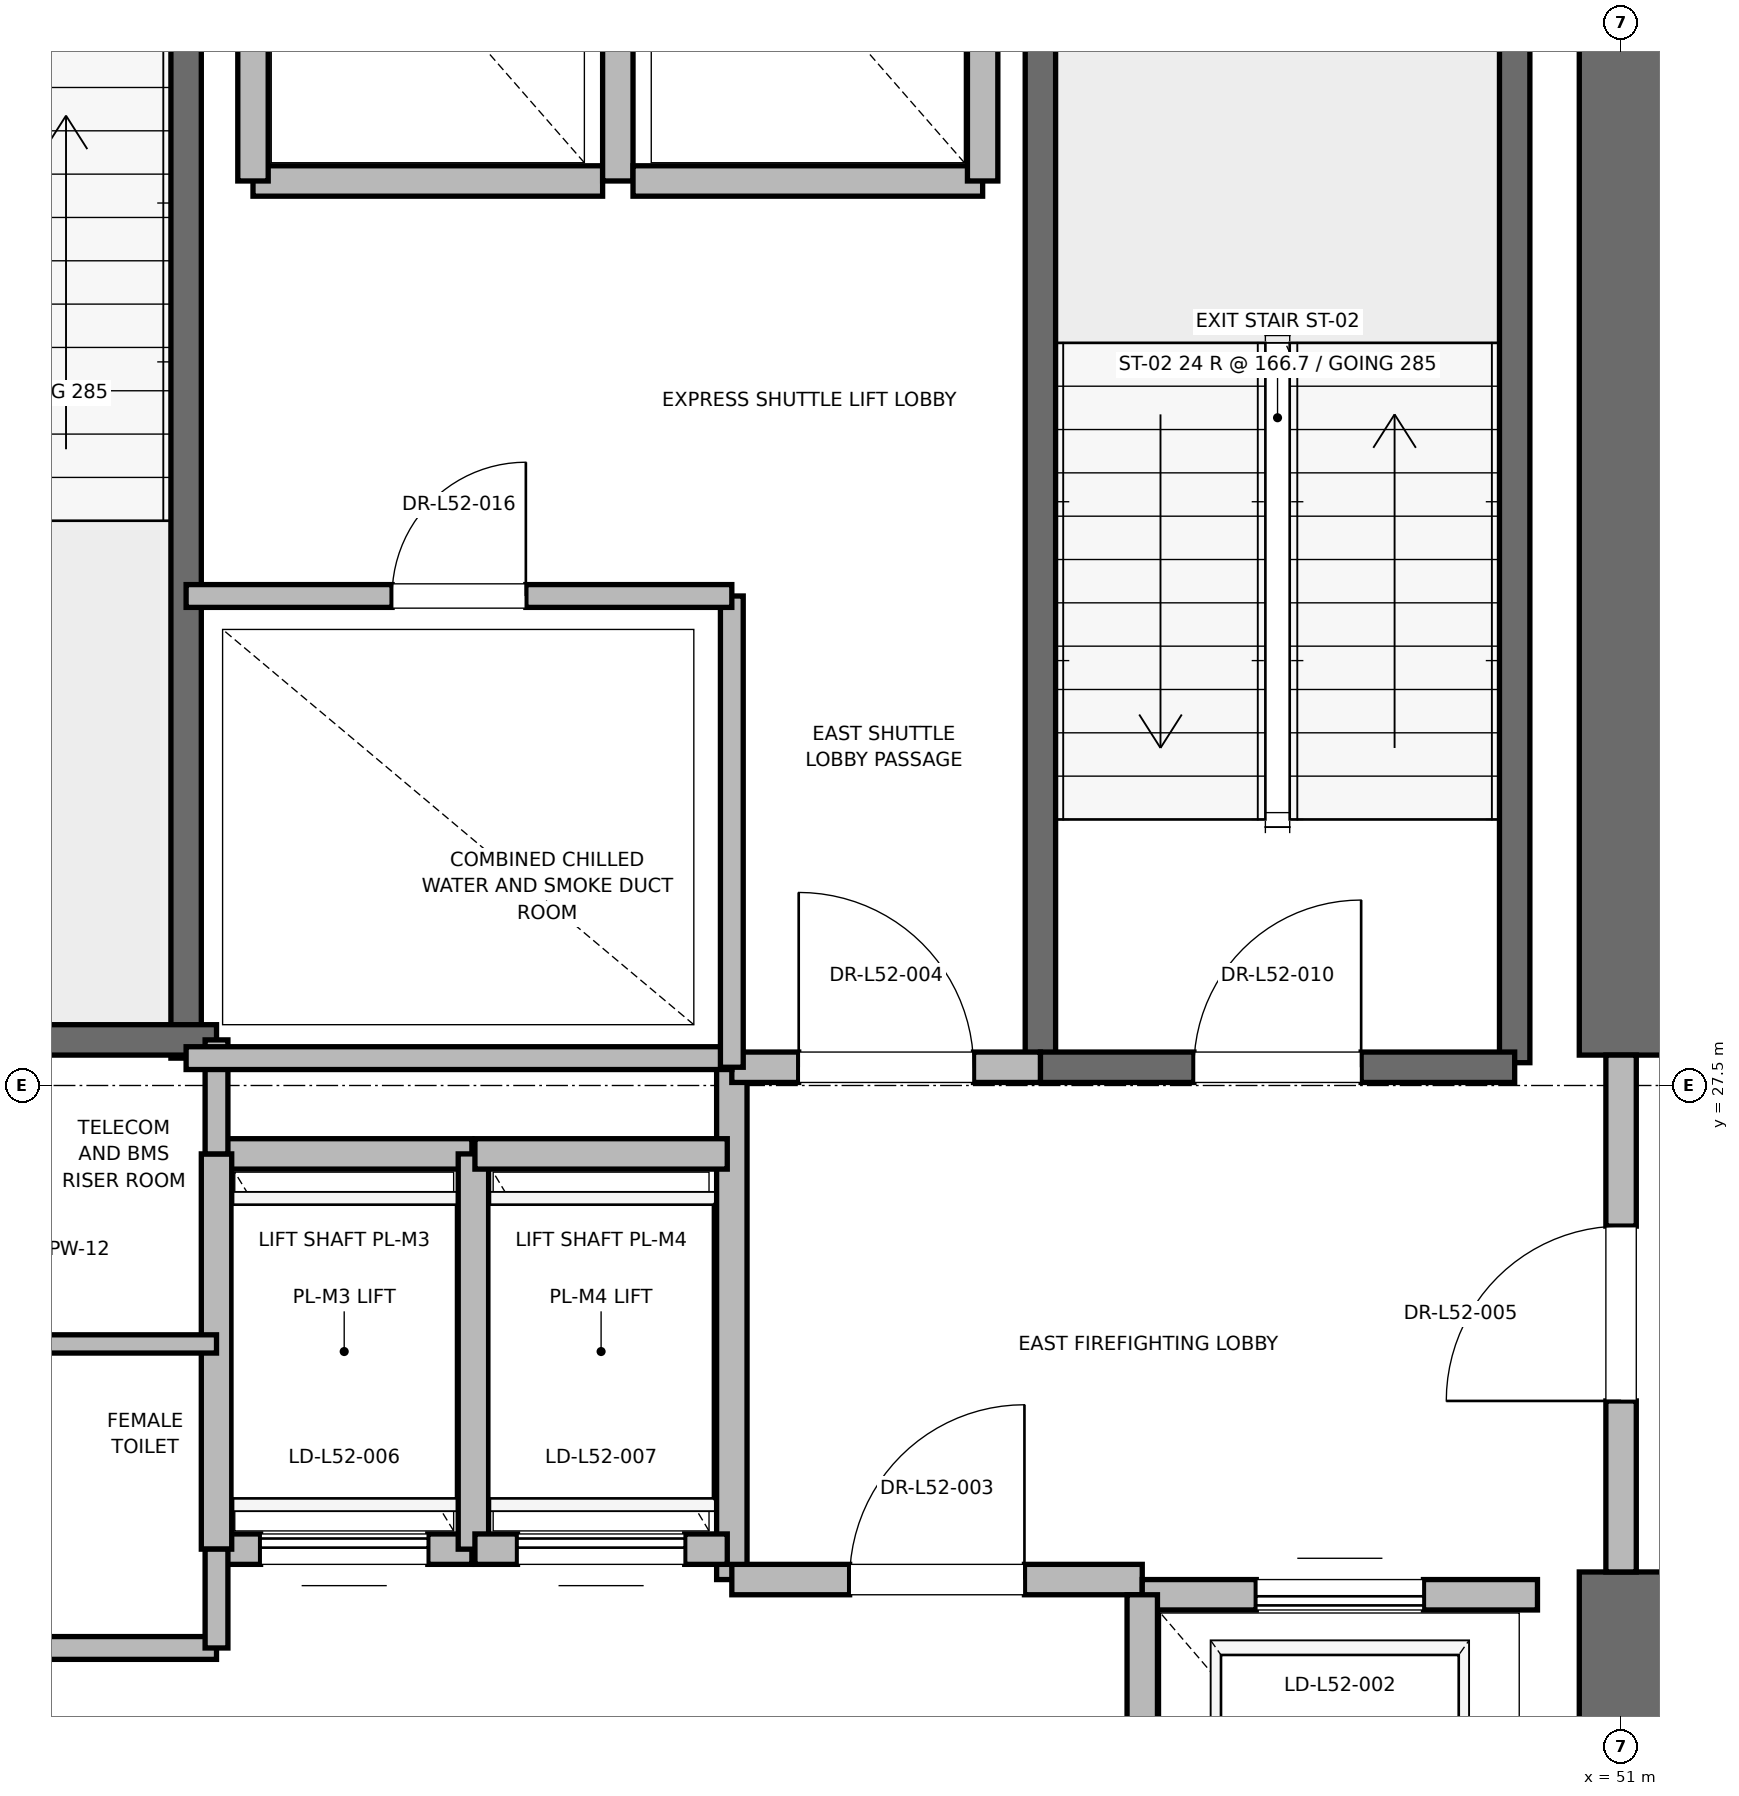
"""IFC4 building model, lengths in metres.
Left out: names, types, materials, properties, quantities, classifications, styles, units other than length and angle.
Written with IfcOpenShell. Run it as: python <this file> out.ifc"""

import sys

from ifc_helpers import new_model, si_unit, direction, frame, frame_2d, origin, place, context, subcontext, project, spatial, rectangle, extrude, element, fill, save


model = new_model("IFC4")
c1 = context("Model", 3, precision=1e-05, world=origin(), true_north=direction((0.0, 1.0)))
c2 = subcontext(c1, "Body", "Model", "MODEL_VIEW")
j1 = project(units=[si_unit("LENGTHUNIT", "METRE"), si_unit("PLANEANGLEUNIT", "RADIAN")], contexts=[c1])
p1 = place(None, origin())
s1 = spatial("IfcSite", under=j1, at=p1, CompositionType="ELEMENT")
p2 = place(p1, origin())
s2 = spatial("IfcBuilding", under=s1, at=p2, CompositionType="ELEMENT")
p3 = place(p2, frame((0.0, 0.0, 225.2)))
s3 = spatial("IfcBuildingStorey", under=s2, at=p3, CompositionType="ELEMENT", Elevation=225.2)
p4 = place(p3, frame((51.0, 18.5, 0.0), z_axis=(0.0, 0.0, 1.0), x_axis=(0.0, 1.0, 0.0)))
e1 = element("IfcWall", 1, at=p4, inside=s3, PredefinedType="SHEAR", context=c2, shape_type="SweptSolid", body=[
    extrude(rectangle(XDim=5.8, YDim=0.55, at=frame_2d((2.9, 0.0))), origin(), (0.0, 0.0, 1.0), 3.775),
])
p5 = place(p3, frame((51.0, 27.7, 0.0), z_axis=(0.0, 0.0, 1.0), x_axis=(0.0, 1.0, 0.0)))
e2 = element("IfcWall", 2, at=p5, inside=s3, PredefinedType="SHEAR", context=c2, shape_type="SweptSolid", body=[
    extrude(rectangle(XDim=8.8, YDim=0.55, at=frame_2d((4.4, 0.0))), origin(), (0.0, 0.0, 1.0), 3.775),
])
p6 = place(p3, frame((50.3, 27.65, 0.0), z_axis=(0.0, 0.0, 1.0), x_axis=(0.0, 1.0, 0.0)))
e3 = element("IfcWall", 3, at=p6, inside=s3, PredefinedType="SOLIDWALL", context=c2, shape_type="SweptSolid", body=[
    extrude(rectangle(XDim=8.15, YDim=0.2, at=frame_2d((4.075, 0.0))), origin(), (0.0, 0.0, 1.0), 3.775),
])
p7 = place(p3, frame((47.18, 27.62, 0.0), z_axis=(0.0, 0.0, 1.0), x_axis=(0.0, 1.0, 0.0)))
e4 = element("IfcWall", 4, at=p7, inside=s3, PredefinedType="SOLIDWALL", context=c2, shape_type="SweptSolid", body=[
    extrude(rectangle(XDim=8.18, YDim=0.2, at=frame_2d((4.09, 0.0))), origin(), (0.0, 0.0, 1.0), 3.775),
])
p8 = place(p3, frame((47.18, 27.62, 0.0), z_axis=(0.0, 0.0, 1.0), x_axis=(1.0, 0.0, 0.0)))
e5 = element("IfcWall", 5, at=p8, inside=s3, PredefinedType="SOLIDWALL", context=c2, shape_type="SweptSolid", body=[
    extrude(rectangle(XDim=3.12, YDim=0.2, at=frame_2d((1.56, 0.0))), origin(), (0.0, 0.0, 1.0), 3.775),
])
p9 = place(p8, frame((1.01, 0.0, 0.0)))
e6 = element("IfcOpeningElement", 6, at=p9, cuts=e5, PredefinedType="OPENING", context=c2, shape_type="SweptSolid", body=[
    extrude(rectangle(XDim=1.1, YDim=2.15, at=frame_2d((0.55, 1.075))), frame((0.0, 0.1, 0.0), z_axis=(0.0, -1.0, 0.0), x_axis=(1.0, 0.0, 0.0)), (0.0, 0.0, 1.0), 0.2),
])
p10 = place(p3, frame((41.56, 27.68, 0.0), z_axis=(0.0, 0.0, 1.0), x_axis=(0.0, 1.0, 0.0)))
e7 = element("IfcWall", 7, at=p10, inside=s3, PredefinedType="SOLIDWALL", context=c2, shape_type="SweptSolid", body=[
    extrude(rectangle(XDim=8.57, YDim=0.2, at=frame_2d((4.285, 0.0))), origin(), (0.0, 0.0, 1.0), 3.775),
])
p11 = place(p3, frame((38.44, 27.8, 0.0), z_axis=(0.0, 0.0, 1.0), x_axis=(1.0, 0.0, 0.0)))
e8 = element("IfcWall", 8, at=p11, inside=s3, PredefinedType="SOLIDWALL", context=c2, shape_type="SweptSolid", body=[
    extrude(rectangle(XDim=3.32, YDim=0.2, at=frame_2d((1.66, 0.0))), origin(), (0.0, 0.0, 1.0), 3.775),
])
p12 = place(p3, frame((45.15, 24.25, 0.0), z_axis=(0.0, 0.0, 1.0), x_axis=(0.0, 1.0, 0.0)))
e9 = element("IfcWall", 9, at=p12, inside=s3, PredefinedType="PARTITIONING", context=c2, shape_type="SweptSolid", body=[
    extrude(rectangle(XDim=3.37, YDim=0.2, at=frame_2d((1.685, 0.0))), origin(), (0.0, 0.0, 1.0), 3.775),
])
p13 = place(p3, frame((45.15, 24.25, 0.0), z_axis=(0.0, 0.0, 1.0), x_axis=(1.0, 0.0, 0.0)))
e10 = element("IfcWall", 10, at=p13, inside=s3, PredefinedType="PARTITIONING", context=c2, shape_type="SweptSolid", body=[
    extrude(rectangle(XDim=2.7, YDim=0.2, at=frame_2d((1.35, 0.0))), origin(), (0.0, 0.0, 1.0), 3.775),
])
p14 = place(p13, frame((0.775, 0.0, 0.0)))
e11 = element("IfcOpeningElement", 11, at=p14, cuts=e10, PredefinedType="OPENING", context=c2, shape_type="SweptSolid", body=[
    extrude(rectangle(XDim=1.15, YDim=2.2, at=frame_2d((0.575, 1.1))), frame((0.0, 0.1, 0.0), z_axis=(0.0, -1.0, 0.0), x_axis=(1.0, 0.0, 0.0)), (0.0, 0.0, 1.0), 0.2),
])
p15 = place(p3, frame((45.15, 27.62, 0.0), z_axis=(0.0, 0.0, 1.0), x_axis=(1.0, 0.0, 0.0)))
e12 = element("IfcWall", 12, at=p15, inside=s3, PredefinedType="PARTITIONING", context=c2, shape_type="SweptSolid", body=[
    extrude(rectangle(XDim=2.03, YDim=0.2, at=frame_2d((1.015, 0.0))), origin(), (0.0, 0.0, 1.0), 3.775),
])
p16 = place(p15, frame((0.44, 0.0, 0.0)))
e13 = element("IfcOpeningElement", 13, at=p16, cuts=e12, PredefinedType="OPENING", context=c2, shape_type="SweptSolid", body=[
    extrude(rectangle(XDim=1.15, YDim=2.2, at=frame_2d((0.575, 1.1))), frame((0.0, 0.1, 0.0), z_axis=(0.0, -1.0, 0.0), x_axis=(1.0, 0.0, 0.0)), (0.0, 0.0, 1.0), 0.2),
])
p17 = place(p3, frame((51.0, 24.3, 0.0), z_axis=(0.0, 0.0, 1.0), x_axis=(0.0, 1.0, 0.0)))
e14 = element("IfcWall", 14, at=p17, inside=s3, PredefinedType="PARTITIONING", context=c2, shape_type="SweptSolid", body=[
    extrude(rectangle(XDim=3.4, YDim=0.2, at=frame_2d((1.7, 0.0))), origin(), (0.0, 0.0, 1.0), 2.755),
])
p18 = place(p17, frame((1.125, 0.0, 0.0)))
e15 = element("IfcOpeningElement", 15, at=p18, cuts=e14, PredefinedType="OPENING", context=c2, shape_type="SweptSolid", body=[
    extrude(rectangle(XDim=1.15, YDim=2.2, at=frame_2d((0.575, 1.1))), frame((0.0, 0.1, 0.0), z_axis=(0.0, -1.0, 0.0), x_axis=(1.0, 0.0, 0.0)), (0.0, 0.0, 1.0), 0.2),
])
p19 = place(p3, frame((50.45, 24.15, 0.0), z_axis=(0.0, 0.0, 1.0), x_axis=(-1.0, 0.0, 0.0)))
e16 = element("IfcWall", 16, at=p19, inside=s3, PredefinedType="SOLIDWALL", context=c2, shape_type="SweptSolid", body=[
    extrude(rectangle(XDim=2.6, YDim=0.2, at=frame_2d((1.3, 0.0))), origin(), (0.0, 0.0, 1.0), 2.755),
])
p20 = place(p19, frame((0.75, 0.0, 0.0)))
e17 = element("IfcOpeningElement", 17, at=p20, cuts=e16, PredefinedType="OPENING", context=c2, shape_type="SweptSolid", body=[
    extrude(rectangle(XDim=1.1, YDim=2.2, at=frame_2d((0.55, 1.1))), frame((0.0, 0.1, 0.0), z_axis=(0.0, -1.0, 0.0), x_axis=(1.0, 0.0, 0.0)), (0.0, 0.0, 1.0), 0.2),
])
p21 = place(p3, frame((47.85, 24.15, 0.0), z_axis=(0.0, 0.0, 1.0), x_axis=(0.0, -1.0, 0.0)))
e18 = element("IfcWall", 18, at=p21, inside=s3, PredefinedType="SOLIDWALL", context=c2, shape_type="SweptSolid", body=[
    extrude(rectangle(XDim=3.0, YDim=0.2, at=frame_2d((1.5, 0.0))), origin(), (0.0, 0.0, 1.0), 3.775),
])
p22 = place(p3, frame((41.76, 24.45, 0.0), z_axis=(0.0, 0.0, 1.0), x_axis=(1.0, 0.0, 0.0)))
e19 = element("IfcWall", 19, at=p22, inside=s3, PredefinedType="SOLIDWALL", context=c2, shape_type="SweptSolid", body=[
    extrude(rectangle(XDim=1.68, YDim=0.2, at=frame_2d((0.84, 0.0))), origin(), (0.0, 0.0, 1.0), 3.775),
])
p23 = place(p22, frame((0.29, 0.0, 0.0)))
e20 = element("IfcOpeningElement", 20, at=p23, cuts=e19, PredefinedType="OPENING", context=c2, shape_type="SweptSolid", body=[
    extrude(rectangle(XDim=1.1, YDim=2.2, at=frame_2d((0.55, 1.1))), frame((0.0, 0.1, 0.0), z_axis=(0.0, -1.0, 0.0), x_axis=(1.0, 0.0, 0.0)), (0.0, 0.0, 1.0), 0.2),
])
p24 = place(p3, frame((43.44, 27.05, 0.0), z_axis=(0.0, 0.0, 1.0), x_axis=(-1.0, 0.0, 0.0)))
e21 = element("IfcWall", 21, at=p24, inside=s3, PredefinedType="SOLIDWALL", context=c2, shape_type="SweptSolid", body=[
    extrude(rectangle(XDim=1.68, YDim=0.2, at=frame_2d((0.84, 0.0))), origin(), (0.0, 0.0, 1.0), 3.775),
])
for number, where, z_axis, x_axis in (
    (22, (41.76, 27.05, 0.0), (0.0, 0.0, 1.0), (0.0, -1.0, 0.0)),
    (23, (43.45, 24.45, 0.0), (0.0, 0.0, 1.0), (0.0, 1.0, 0.0)),
):
    element("IfcWall", number, at=place(p3, frame(where, z_axis=z_axis, x_axis=x_axis)), inside=s3, PredefinedType="SOLIDWALL", context=c2, shape_type="SweptSolid", body=[
        extrude(rectangle(XDim=2.6, YDim=0.2, at=frame_2d((1.3, 0.0))), origin(), (0.0, 0.0, 1.0), 3.775),
    ])
p25 = place(p3, frame((43.46, 24.45, 0.0), z_axis=(0.0, 0.0, 1.0), x_axis=(1.0, 0.0, 0.0)))
e24 = element("IfcWall", 24, at=p25, inside=s3, PredefinedType="SOLIDWALL", context=c2, shape_type="SweptSolid", body=[
    extrude(rectangle(XDim=1.66, YDim=0.2, at=frame_2d((0.83, 0.0))), origin(), (0.0, 0.0, 1.0), 3.775),
])
p26 = place(p25, frame((0.28, 0.0, 0.0)))
e25 = element("IfcOpeningElement", 25, at=p26, cuts=e24, PredefinedType="OPENING", context=c2, shape_type="SweptSolid", body=[
    extrude(rectangle(XDim=1.1, YDim=2.2, at=frame_2d((0.55, 1.1))), frame((0.0, 0.1, 0.0), z_axis=(0.0, -1.0, 0.0), x_axis=(1.0, 0.0, 0.0)), (0.0, 0.0, 1.0), 0.2),
])
p27 = place(p3, frame((45.12, 27.05, 0.0), z_axis=(0.0, 0.0, 1.0), x_axis=(-1.0, 0.0, 0.0)))
e26 = element("IfcWall", 26, at=p27, inside=s3, PredefinedType="SOLIDWALL", context=c2, shape_type="SweptSolid", body=[
    extrude(rectangle(XDim=1.66, YDim=0.2, at=frame_2d((0.83, 0.0))), origin(), (0.0, 0.0, 1.0), 3.775),
])
p28 = place(p3, frame((42.0, 33.45, 0.0), z_axis=(0.0, 0.0, 1.0), x_axis=(1.0, 0.0, 0.0)))
e27 = element("IfcWall", 27, at=p28, inside=s3, PredefinedType="SOLIDWALL", context=c2, shape_type="SweptSolid", body=[
    extrude(rectangle(XDim=2.3, YDim=0.2, at=frame_2d((1.15, 0.0))), origin(), (0.0, 0.0, 1.0), 3.775),
])
for number, where, z_axis, x_axis in (
    (28, (42.0, 36.05, 0.0), (0.0, 0.0, 1.0), (0.0, -1.0, 0.0)),
    (29, (44.4, 33.45, 0.0), (0.0, 0.0, 1.0), (0.0, 1.0, 0.0)),
):
    element("IfcWall", number, at=place(p3, frame(where, z_axis=z_axis, x_axis=x_axis)), inside=s3, PredefinedType="SOLIDWALL", context=c2, shape_type="SweptSolid", body=[
        extrude(rectangle(XDim=2.6, YDim=0.2, at=frame_2d((1.3, 0.0))), origin(), (0.0, 0.0, 1.0), 2.755),
    ])
p29 = place(p3, frame((44.5, 33.45, 0.0), z_axis=(0.0, 0.0, 1.0), x_axis=(1.0, 0.0, 0.0)))
e30 = element("IfcWall", 30, at=p29, inside=s3, PredefinedType="SOLIDWALL", context=c2, shape_type="SweptSolid", body=[
    extrude(rectangle(XDim=2.3, YDim=0.2, at=frame_2d((1.15, 0.0))), origin(), (0.0, 0.0, 1.0), 3.775),
])
p30 = place(p3, frame((46.8, 33.45, 0.0), z_axis=(0.0, 0.0, 1.0), x_axis=(0.0, 1.0, 0.0)))
e31 = element("IfcWall", 31, at=p30, inside=s3, PredefinedType="SOLIDWALL", context=c2, shape_type="SweptSolid", body=[
    extrude(rectangle(XDim=2.6, YDim=0.2, at=frame_2d((1.3, 0.0))), origin(), (0.0, 0.0, 1.0), 3.775),
])
p31 = place(p3, frame((39.95, 23.8, 0.0), z_axis=(0.0, 0.0, 1.0), x_axis=(1.0, 0.0, 0.0)))
e32 = element("IfcWall", 32, at=p31, inside=s3, PredefinedType="PARTITIONING", context=c2, shape_type="SweptSolid", body=[
    extrude(rectangle(XDim=1.81, YDim=0.15, at=frame_2d((0.905, 0.0))), origin(), (0.0, 0.0, 1.0), 2.85),
])
p32 = place(p3, frame((39.95, 25.8, 0.0), z_axis=(0.0, 0.0, 1.0), x_axis=(1.0, 0.0, 0.0)))
e33 = element("IfcWall", 33, at=p32, inside=s3, PredefinedType="PARTITIONING", context=c2, shape_type="SweptSolid", body=[
    extrude(rectangle(XDim=1.81, YDim=0.12, at=frame_2d((0.905, 0.0))), origin(), (0.0, 0.0, 1.0), 2.85),
])
p33 = place(p3, frame((41.76, 23.8, 0.0), z_axis=(0.0, 0.0, 1.0), x_axis=(0.0, 1.0, 0.0)))
e34 = element("IfcWall", 34, at=p33, inside=s3, PredefinedType="PARTITIONING", context=c2, shape_type="SweptSolid", body=[
    extrude(rectangle(XDim=0.65, YDim=0.15, at=frame_2d((0.325, 0.0))), origin(), (0.0, 0.0, 1.0), 2.85),
])
p34 = place(p3, frame((41.76, 27.05, 0.0), z_axis=(0.0, 0.0, 1.0), x_axis=(0.0, 1.0, 0.0)))
e35 = element("IfcWall", 35, at=p34, inside=s3, PredefinedType="PARTITIONING", context=c2, shape_type="SweptSolid", body=[
    extrude(rectangle(XDim=0.75, YDim=0.15, at=frame_2d((0.375, 0.0))), origin(), (0.0, 0.0, 1.0), 2.85),
])
p35 = place(p3, frame((41.56, 27.68, 0.0), z_axis=(0.0, 0.0, 1.0), x_axis=(1.0, 0.0, 0.0)))
e36 = element("IfcWall", 36, at=p35, inside=s3, PredefinedType="PARTITIONING", context=c2, shape_type="SweptSolid", body=[
    extrude(rectangle(XDim=3.59, YDim=0.15, at=frame_2d((1.795, 0.0))), origin(), (0.0, 0.0, 1.0), 2.85),
])
p36 = place(p3, frame((45.15, 27.62, 0.0), z_axis=(0.0, 0.0, 1.0), x_axis=(0.0, 1.0, 0.0)))
e37 = element("IfcWall", 37, at=p36, inside=s3, PredefinedType="PARTITIONING", context=c2, shape_type="SweptSolid", body=[
    extrude(rectangle(XDim=3.1, YDim=0.15, at=frame_2d((1.55, 0.0))), origin(), (0.0, 0.0, 1.0), 2.85),
])
p37 = place(p3, frame((41.56, 30.72, 0.0), z_axis=(0.0, 0.0, 1.0), x_axis=(1.0, 0.0, 0.0)))
e38 = element("IfcWall", 38, at=p37, inside=s3, PredefinedType="PARTITIONING", context=c2, shape_type="SweptSolid", body=[
    extrude(rectangle(XDim=3.59, YDim=0.15, at=frame_2d((1.795, 0.0))), origin(), (0.0, 0.0, 1.0), 2.85),
])
p38 = place(p37, frame((1.355, 0.0, 0.0)))
e39 = element("IfcOpeningElement", 39, at=p38, cuts=e38, PredefinedType="OPENING", context=c2, shape_type="SweptSolid", body=[
    extrude(rectangle(XDim=0.88, YDim=2.1, at=frame_2d((0.44, 1.05))), frame((0.0, 0.075, 0.0), z_axis=(0.0, -1.0, 0.0), x_axis=(1.0, 0.0, 0.0)), (0.0, 0.0, 1.0), 0.15),
])
p39 = place(p9, origin())
e40 = element("IfcDoor", 40, at=p39, inside=s3, OperationType="SINGLE_SWING_RIGHT", PredefinedType="DOOR", context=c2, shape_type="SweptSolid", body=[
    extrude(rectangle(XDim=1.1, YDim=2.15, at=frame_2d((0.55, 1.075))), frame((0.0, 0.025, 0.0), z_axis=(0.0, -1.0, 0.0), x_axis=(1.0, 0.0, 0.0)), (0.0, 0.0, 1.0), 0.05),
])
fill(e6, e40)
p40 = place(p14, origin())
e41 = element("IfcDoor", 41, at=p40, inside=s3, OperationType="SINGLE_SWING_RIGHT", PredefinedType="DOOR", context=c2, shape_type="SweptSolid", body=[
    extrude(rectangle(XDim=1.15, YDim=2.2, at=frame_2d((0.575, 1.1))), frame((0.0, 0.025, 0.0), z_axis=(0.0, -1.0, 0.0), x_axis=(1.0, 0.0, 0.0)), (0.0, 0.0, 1.0), 0.05),
])
fill(e11, e41)
p41 = place(p16, origin())
e42 = element("IfcDoor", 42, at=p41, inside=s3, OperationType="SINGLE_SWING_LEFT", PredefinedType="DOOR", context=c2, shape_type="SweptSolid", body=[
    extrude(rectangle(XDim=1.15, YDim=2.2, at=frame_2d((0.575, 1.1))), frame((0.0, 0.025, 0.0), z_axis=(0.0, -1.0, 0.0), x_axis=(1.0, 0.0, 0.0)), (0.0, 0.0, 1.0), 0.05),
])
fill(e13, e42)
p42 = place(p18, origin())
e43 = element("IfcDoor", 43, at=p42, inside=s3, OperationType="SINGLE_SWING_LEFT", PredefinedType="DOOR", context=c2, shape_type="SweptSolid", body=[
    extrude(rectangle(XDim=1.15, YDim=2.2, at=frame_2d((0.575, 1.1))), frame((0.0, 0.025, 0.0), z_axis=(0.0, -1.0, 0.0), x_axis=(1.0, 0.0, 0.0)), (0.0, 0.0, 1.0), 0.05),
])
fill(e15, e43)
p43 = place(p20, origin())
e44 = element("IfcDoor", 44, at=p43, inside=s3, OperationType="SLIDING_TO_RIGHT", PredefinedType="DOOR", context=c2, shape_type="SweptSolid", body=[
    extrude(rectangle(XDim=1.1, YDim=2.2, at=frame_2d((0.55, 1.1))), frame((0.0, 0.025, 0.0), z_axis=(0.0, -1.0, 0.0), x_axis=(1.0, 0.0, 0.0)), (0.0, 0.0, 1.0), 0.05),
])
fill(e17, e44)
p44 = place(p23, origin())
e45 = element("IfcDoor", 45, at=p44, inside=s3, OperationType="SLIDING_TO_RIGHT", PredefinedType="DOOR", context=c2, shape_type="SweptSolid", body=[
    extrude(rectangle(XDim=1.1, YDim=2.2, at=frame_2d((0.55, 1.1))), frame((0.0, 0.025, 0.0), z_axis=(0.0, -1.0, 0.0), x_axis=(1.0, 0.0, 0.0)), (0.0, 0.0, 1.0), 0.05),
])
fill(e20, e45)
p45 = place(p26, origin())
e46 = element("IfcDoor", 46, at=p45, inside=s3, OperationType="SLIDING_TO_RIGHT", PredefinedType="DOOR", context=c2, shape_type="SweptSolid", body=[
    extrude(rectangle(XDim=1.1, YDim=2.2, at=frame_2d((0.55, 1.1))), frame((0.0, 0.025, 0.0), z_axis=(0.0, -1.0, 0.0), x_axis=(1.0, 0.0, 0.0)), (0.0, 0.0, 1.0), 0.05),
])
fill(e25, e46)
p46 = place(p38, origin())
e47 = element("IfcDoor", 47, at=p46, inside=s3, OperationType="SINGLE_SWING_RIGHT", PredefinedType="DOOR", context=c2, shape_type="SweptSolid", body=[
    extrude(rectangle(XDim=0.88, YDim=2.1, at=frame_2d((0.44, 1.05))), frame((0.0, 0.025, 0.0), z_axis=(0.0, -1.0, 0.0), x_axis=(1.0, 0.0, 0.0)), (0.0, 0.0, 1.0), 0.05),
])
fill(e39, e47)
save(model, sys.argv[1])
